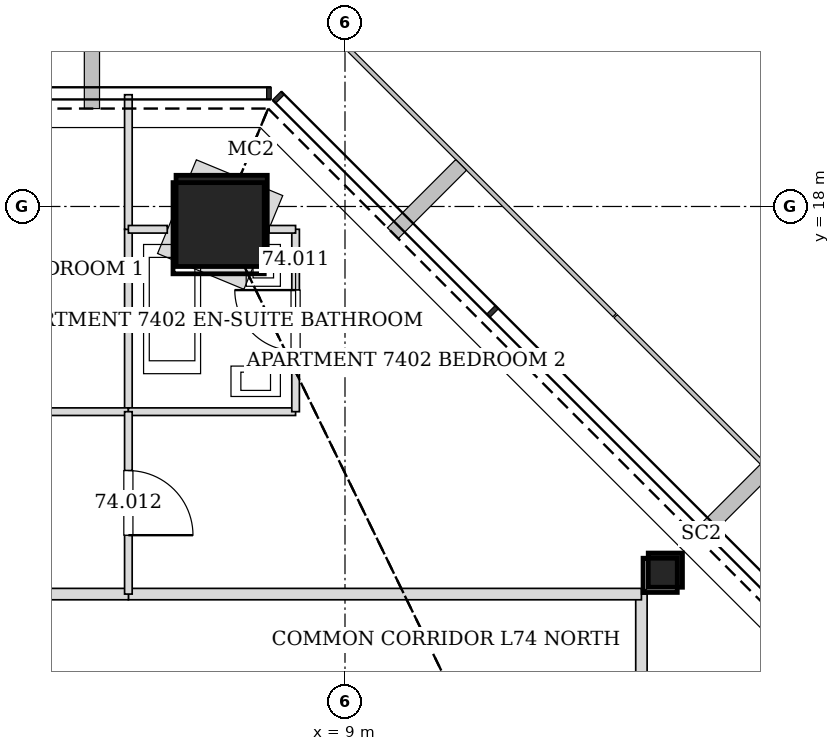
"""IFC4 building model, lengths in metres.
Left out: names, types, materials, properties, quantities, classifications, styles, units other than length and angle.
Written with IfcOpenShell. Run it as: python <this file> out.ifc"""

import sys

from ifc_helpers import new_model, si_unit, direction, frame, frame_2d, origin, origin_2d, place, context, subcontext, project, spatial, rectangle, hollow_rectangle, extrude, element, fill, save


model = new_model("IFC4")
c1 = context("Model", 3, precision=1e-05, world=origin(), true_north=direction((0.0, 1.0)))
c2 = subcontext(c1, "Body", "Model", "MODEL_VIEW")
j1 = project(units=[si_unit("LENGTHUNIT", "METRE"), si_unit("PLANEANGLEUNIT", "RADIAN")], contexts=[c1])
p1 = place(None, origin())
s1 = spatial("IfcSite", under=j1, at=p1, CompositionType="ELEMENT")
p2 = place(p1, origin())
s2 = spatial("IfcBuilding", under=s1, at=p2, CompositionType="ELEMENT")
p3 = place(p2, frame((0.0, 0.0, 301.4)))
s3 = spatial("IfcBuildingStorey", under=s2, at=p3, CompositionType="ELEMENT", Elevation=301.4)
p4 = place(p3, frame((7.377, 17.81, 0.0), z_axis=(-0.011698403216, -0.028277121884, 0.999531666202), x_axis=(0.924045401938, -0.382282742426, 0.0)))
e1 = element("IfcColumn", 1, at=p4, inside=s3, PredefinedType="COLUMN", context=c2, shape_type="SweptSolid", body=[
    extrude(hollow_rectangle(XDim=1.2, YDim=1.2, WallThickness=0.055, at=origin_2d()), origin(), (0.0, 0.0, 1.0), 3.402),
])
p5 = place(p3, frame((13.215, 13.215, 0.0), z_axis=(-0.020024994503, -0.020024994503, 0.999598919162), x_axis=(0.707106781187, -0.707106781187, 0.0)))
e2 = element("IfcColumn", 2, at=p5, inside=s3, PredefinedType="COLUMN", context=c2, shape_type="SweptSolid", body=[
    extrude(hollow_rectangle(XDim=0.45, YDim=0.45, WallThickness=0.02, at=origin_2d()), origin(), (0.0, 0.0, 1.0), 3.402),
])
for number, where, z_axis, x_axis in (
    (3, (12.9, 6.149, 0.0), (0.0, 0.0, 1.0), (0.0, 1.0, 0.0)),
    (4, (12.9, 12.9, 0.0), (0.0, 0.0, 1.0), (-1.0, 0.0, 0.0)),
):
    element("IfcWall", number, at=place(p3, frame(where, z_axis=z_axis, x_axis=x_axis)), inside=s3, PredefinedType="PARTITIONING", context=c2, shape_type="SweptSolid", body=[
        extrude(rectangle(XDim=6.751, YDim=0.15, at=frame_2d((3.375, 0.0))), origin(), (0.0, 0.0, 1.0), 2.436),
    ])
p6 = place(p3, frame((6.151, 12.9, 0.0), z_axis=(0.0, 0.0, 1.0), x_axis=(-1.0, 0.0, 0.0)))
e5 = element("IfcWall", 5, at=p6, inside=s3, PredefinedType="PARTITIONING", context=c2, shape_type="SweptSolid", body=[
    extrude(rectangle(XDim=7.351, YDim=0.15, at=frame_2d((3.675, 0.0))), origin(), (0.0, 0.0, 1.0), 2.349),
])
p7 = place(p6, frame((3.2, 0.0, 0.0)))
e6 = element("IfcOpeningElement", 6, at=p7, cuts=e5, PredefinedType="OPENING", context=c2, shape_type="SweptSolid", body=[
    extrude(rectangle(XDim=0.95, YDim=2.1, at=frame_2d((0.475, 1.05))), frame((0.0, 0.085, 0.0), z_axis=(0.0, -1.0, 0.0), x_axis=(1.0, 0.0, 0.0)), (0.0, 0.0, 1.0), 0.17),
])
p8 = place(p3, frame((6.15, 15.3, 0.0), z_axis=(0.0, 0.0, 1.0), x_axis=(0.0, 1.0, 0.0)))
e7 = element("IfcWall", 7, at=p8, inside=s3, PredefinedType="PARTITIONING", context=c2, shape_type="SweptSolid", body=[
    extrude(rectangle(XDim=2.401, YDim=0.1, at=frame_2d((1.2, 0.0))), origin(), (0.0, 0.0, 1.0), 2.662),
])
p9 = place(p3, frame((6.15, 17.699, 0.0), z_axis=(0.0, 0.0, 1.0), x_axis=(0.0, 1.0, 0.0)))
e8 = element("IfcWall", 8, at=p9, inside=s3, PredefinedType="PARTITIONING", context=c2, shape_type="SweptSolid", body=[
    extrude(rectangle(XDim=1.771, YDim=0.1, at=frame_2d((0.886, 0.0))), origin(), (0.0, 0.0, 1.0), 2.74),
])
p10 = place(p3, frame((2.35, 15.3, 0.0), z_axis=(0.0, 0.0, 1.0), x_axis=(1.0, 0.0, 0.0)))
e9 = element("IfcWall", 9, at=p10, inside=s3, PredefinedType="PARTITIONING", context=c2, shape_type="SweptSolid", body=[
    extrude(rectangle(XDim=3.8, YDim=0.1, at=frame_2d((1.9, 0.0))), origin(), (0.0, 0.0, 1.0), 3.2),
])
p11 = place(p10, frame((1.475, 0.0, 0.0)))
e10 = element("IfcOpeningElement", 10, at=p11, cuts=e9, PredefinedType="OPENING", context=c2, shape_type="SweptSolid", body=[
    extrude(rectangle(XDim=0.85, YDim=2.1, at=frame_2d((0.425, 1.05))), frame((0.0, 0.06, 0.0), z_axis=(0.0, -1.0, 0.0), x_axis=(1.0, 0.0, 0.0)), (0.0, 0.0, 1.0), 0.12),
])
p12 = place(p3, frame((6.15, 15.3, 0.0), z_axis=(0.0, 0.0, 1.0), x_axis=(1.0, 0.0, 0.0)))
e11 = element("IfcWall", 11, at=p12, inside=s3, PredefinedType="PARTITIONING", context=c2, shape_type="SweptSolid", body=[
    extrude(rectangle(XDim=2.2, YDim=0.1, at=frame_2d((1.1, 0.0))), origin(), (0.0, 0.0, 1.0), 3.2),
])
p13 = place(p3, frame((8.35, 15.3, 0.0), z_axis=(0.0, 0.0, 1.0), x_axis=(0.0, 1.0, 0.0)))
e12 = element("IfcWall", 12, at=p13, inside=s3, PredefinedType="PARTITIONING", context=c2, shape_type="SweptSolid", body=[
    extrude(rectangle(XDim=2.4, YDim=0.1, at=frame_2d((1.2, 0.0))), origin(), (0.0, 0.0, 1.0), 2.436),
])
p14 = place(p13, frame((0.8, 0.0, 0.0)))
e13 = element("IfcOpeningElement", 13, at=p14, cuts=e12, PredefinedType="OPENING", context=c2, shape_type="SweptSolid", body=[
    extrude(rectangle(XDim=0.8, YDim=2.1, at=frame_2d((0.4, 1.05))), frame((0.0, 0.06, 0.0), z_axis=(0.0, -1.0, 0.0), x_axis=(1.0, 0.0, 0.0)), (0.0, 0.0, 1.0), 0.12),
])
p15 = place(p3, frame((8.35, 17.7, 0.0), z_axis=(0.0, 0.0, 1.0), x_axis=(-1.0, 0.0, 0.0)))
e14 = element("IfcWall", 14, at=p15, inside=s3, PredefinedType="PARTITIONING", context=c2, shape_type="SweptSolid", body=[
    extrude(rectangle(XDim=0.348, YDim=0.1, at=frame_2d((0.174, 0.0))), origin(), (0.0, 0.0, 1.0), 3.2),
])
p16 = place(p3, frame((6.662, 17.7, 0.0), z_axis=(0.0, 0.0, 1.0), x_axis=(-1.0, 0.0, 0.0)))
e15 = element("IfcWall", 15, at=p16, inside=s3, PredefinedType="PARTITIONING", context=c2, shape_type="SweptSolid", body=[
    extrude(rectangle(XDim=0.512, YDim=0.1, at=frame_2d((0.256, 0.0))), origin(), (0.0, 0.0, 1.0), 2.74),
])
p17 = place(p3, frame((6.15, 15.3, 0.0), z_axis=(0.0, 0.0, 1.0), x_axis=(0.0, -1.0, 0.0)))
e16 = element("IfcWall", 16, at=p17, inside=s3, PredefinedType="PARTITIONING", context=c2, shape_type="SweptSolid", body=[
    extrude(rectangle(XDim=2.4, YDim=0.1, at=frame_2d((1.2, 0.0))), origin(), (0.0, 0.0, 1.0), 2.662),
])
p18 = place(p17, frame((0.775, 0.0, 0.0)))
e17 = element("IfcOpeningElement", 17, at=p18, cuts=e16, PredefinedType="OPENING", context=c2, shape_type="SweptSolid", body=[
    extrude(rectangle(XDim=0.85, YDim=2.1, at=frame_2d((0.425, 1.05))), frame((0.0, 0.06, 0.0), z_axis=(0.0, -1.0, 0.0), x_axis=(1.0, 0.0, 0.0)), (0.0, 0.0, 1.0), 0.12),
])
p19 = place(p14, origin())
e18 = element("IfcDoor", 18, at=p19, inside=s3, OperationType="SINGLE_SWING_RIGHT", PredefinedType="DOOR", context=c2, shape_type="SweptSolid", body=[
    extrude(rectangle(XDim=0.8, YDim=2.1, at=frame_2d((0.4, 1.05))), frame((0.0, 0.025, 0.0), z_axis=(0.0, -1.0, 0.0), x_axis=(1.0, 0.0, 0.0)), (0.0, 0.0, 1.0), 0.05),
])
fill(e13, e18)
p20 = place(p18, origin())
e19 = element("IfcDoor", 19, at=p20, inside=s3, OperationType="SINGLE_SWING_RIGHT", PredefinedType="DOOR", context=c2, shape_type="SweptSolid", body=[
    extrude(rectangle(XDim=0.85, YDim=2.1, at=frame_2d((0.425, 1.05))), frame((0.0, 0.025, 0.0), z_axis=(0.0, -1.0, 0.0), x_axis=(1.0, 0.0, 0.0)), (0.0, 0.0, 1.0), 0.05),
])
fill(e17, e19)
save(model, sys.argv[1])
